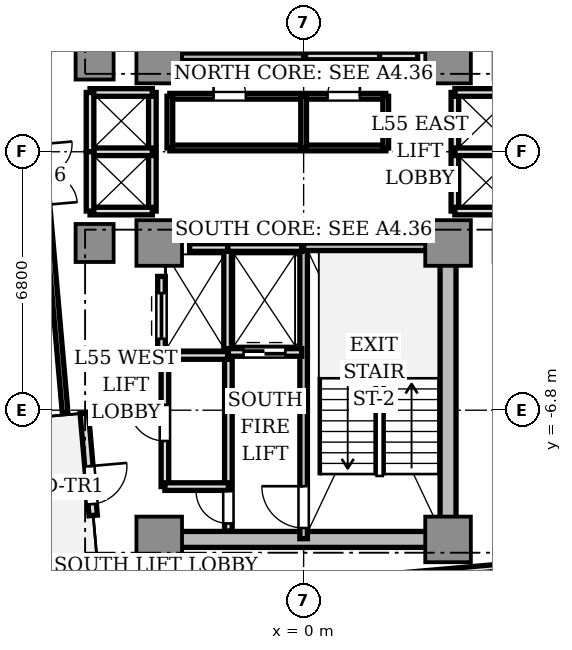
"""IFC4 building model, lengths in metres.
Left out: names, types, materials, properties, quantities, classifications, styles, units other than length and angle.
Written with IfcOpenShell. Run it as: python <this file> out.ifc"""

import sys

from ifc_helpers import new_model, si_unit, direction, frame, frame_2d, origin, origin_2d, place, context, subcontext, project, spatial, rectangle, extrude, source, transform, mapped, element, fill, save


model = new_model("IFC4")
c1 = context("Model", 3, precision=1e-05, world=origin(), true_north=direction((0.0, 1.0)))
c2 = subcontext(c1, "Body", "Model", "MODEL_VIEW")
j1 = project(units=[si_unit("LENGTHUNIT", "METRE"), si_unit("PLANEANGLEUNIT", "RADIAN")], contexts=[c1])
p1 = place(None, origin())
s1 = spatial("IfcSite", under=j1, at=p1, CompositionType="ELEMENT")
p2 = place(p1, origin())
s2 = spatial("IfcBuilding", under=s1, at=p2, CompositionType="ELEMENT")
p3 = place(p2, frame((0.0, 0.0, 198.65)))
s3 = spatial("IfcBuildingStorey", under=s2, at=p3, CompositionType="ELEMENT", Elevation=198.65)
p4 = place(p3, frame((-3.55, -10.2, 0.0), z_axis=(0.0, 0.0, 1.0), x_axis=(1.0, 0.0, 0.0)))
e1 = element("IfcWall", 1, at=p4, inside=s3, PredefinedType="SHEAR", context=c2, shape_type="SweptSolid", body=[
    extrude(rectangle(XDim=7.1, YDim=0.42, at=frame_2d((3.55, 0.0))), origin(), (0.0, 0.0, 1.0), 3.03),
])
p5 = place(p3, frame((3.8, -9.75, 0.0), z_axis=(0.0, 0.0, 1.0), x_axis=(0.0, 1.0, 0.0)))
e2 = element("IfcWall", 2, at=p5, inside=s3, PredefinedType="SHEAR", context=c2, shape_type="SweptSolid", body=[
    extrude(rectangle(XDim=6.9, YDim=0.42, at=frame_2d((3.45, 0.0))), origin(), (0.0, 0.0, 1.0), 3.03),
])
m1 = source(origin(), c2, "Body", "SweptSolid", [
    extrude(rectangle(XDim=1.2, YDim=1.2, at=origin_2d()), origin(), (0.0, 0.0, 1.0), 3.03),
])
for number, where, z_axis, x_axis in (
    (3, (-3.8, 2.4, 0.0), (0.0, 0.0, 1.0), (1.0, 0.0, 0.0)),
    (4, (3.8, 2.4, 0.0), (0.0, 0.0, 1.0), (1.0, 0.0, 0.0)),
    (5, (-3.8, -2.4, 0.0), (0.0, 0.0, 1.0), (1.0, 0.0, 0.0)),
    (6, (3.8, -2.4, 0.0), (0.0, 0.0, 1.0), (1.0, 0.0, 0.0)),
    (7, (-3.8, -10.2, 0.0), (0.0, 0.0, 1.0), (1.0, 0.0, 0.0)),
    (8, (3.8, -10.2, 0.0), (0.0, 0.0, 1.0), (1.0, 0.0, 0.0)),
):
    element("IfcColumn", number, at=place(p3, frame(where, z_axis=z_axis, x_axis=x_axis)), inside=s3, PredefinedType="COLUMN", context=c2, shape_type="MappedRepresentation", body=[
        mapped(m1, transform((0.0, 0.0, 0.0), scale=1.0)),
    ])
m2 = source(origin(), c2, "Body", "SweptSolid", [
    extrude(rectangle(XDim=1.0, YDim=1.0, at=origin_2d()), origin(), (0.0, 0.0, 1.0), 3.03),
])
for number, where, z_axis, x_axis in (
    (9, (-5.5, 2.4, 0.0), (0.0, 0.0, 1.0), (1.0, 0.0, 0.0)),
    (10, (-5.5, -2.4, 0.0), (0.0, 0.0, 1.0), (1.0, 0.0, 0.0)),
):
    element("IfcColumn", number, at=place(p3, frame(where, z_axis=z_axis, x_axis=x_axis)), inside=s3, PredefinedType="COLUMN", context=c2, shape_type="MappedRepresentation", body=[
        mapped(m2, transform((0.0, 0.0, 0.0), scale=1.0)),
    ])
p6 = place(p3, frame((-5.772, -6.879, 0.0), z_axis=(0.0, 0.0, 1.0), x_axis=(0.087168071984, -0.996193619346, 0.0)))
e11 = element("IfcWall", 11, at=p6, inside=s3, PredefinedType="STANDARD", context=c2, shape_type="SweptSolid", body=[
    extrude(rectangle(XDim=2.7, YDim=0.22, at=frame_2d((1.35, 0.0))), origin(), (0.0, 0.0, 1.0), 3.03),
])
p7 = place(p6, frame((1.4, 0.0, 0.0)))
e12 = element("IfcOpeningElement", 12, at=p7, cuts=e11, PredefinedType="OPENING", context=c2, shape_type="SweptSolid", body=[
    extrude(rectangle(XDim=1.0, YDim=2.2, at=frame_2d((0.5, 1.1))), frame((0.0, 0.12, 0.0), z_axis=(0.0, -1.0, 0.0), x_axis=(1.0, 0.0, 0.0)), (0.0, 0.0, 1.0), 0.24),
])
p8 = place(p3, frame((0.0, 2.5, 0.0), z_axis=(0.0, 0.0, 1.0), x_axis=(0.0, 1.0, 0.0)))
e13 = element("IfcWall", 13, at=p8, inside=s3, PredefinedType="SOLIDWALL", context=c2, shape_type="SweptSolid", body=[
    extrude(rectangle(XDim=7.68, YDim=0.2, at=frame_2d((3.84, 0.0))), origin(), (0.0, 0.0, 1.0), 3.03),
])
p9 = place(p8, frame((6.36, 0.0, 0.0)))
e14 = element("IfcOpeningElement", 14, at=p9, cuts=e13, PredefinedType="OPENING", context=c2, shape_type="SweptSolid", body=[
    extrude(rectangle(XDim=1.1, YDim=2.15, at=frame_2d((0.55, 1.075))), frame((0.0, 0.11, 0.0), z_axis=(0.0, -1.0, 0.0), x_axis=(1.0, 0.0, 0.0)), (0.0, 0.0, 1.0), 0.22),
])
p10 = place(p3, frame((-3.72, 2.5, 0.0), z_axis=(0.0, 0.0, 1.0), x_axis=(1.0, 0.0, 0.0)))
e15 = element("IfcWall", 15, at=p10, inside=s3, PredefinedType="SOLIDWALL", context=c2, shape_type="SweptSolid", body=[
    extrude(rectangle(XDim=3.72, YDim=0.2, at=frame_2d((1.86, 0.0))), origin(), (0.0, 0.0, 1.0), 3.03),
])
p11 = place(p3, frame((0.0, -10.18, 0.0), z_axis=(0.0, 0.0, 1.0), x_axis=(0.0, 1.0, 0.0)))
e16 = element("IfcWall", 16, at=p11, inside=s3, PredefinedType="SOLIDWALL", context=c2, shape_type="SweptSolid", body=[
    extrude(rectangle(XDim=7.68, YDim=0.2, at=frame_2d((3.84, 0.0))), origin(), (0.0, 0.0, 1.0), 3.03),
])
p12 = place(p11, frame((0.28, 0.0, 0.0)))
e17 = element("IfcOpeningElement", 17, at=p12, cuts=e16, PredefinedType="OPENING", context=c2, shape_type="SweptSolid", body=[
    extrude(rectangle(XDim=1.1, YDim=2.15, at=frame_2d((0.55, 1.075))), frame((0.0, 0.11, 0.0), z_axis=(0.0, -1.0, 0.0), x_axis=(1.0, 0.0, 0.0)), (0.0, 0.0, 1.0), 0.22),
])
p13 = place(p3, frame((0.0, -2.5, 0.0), z_axis=(0.0, 0.0, 1.0), x_axis=(1.0, 0.0, 0.0)))
e18 = element("IfcWall", 18, at=p13, inside=s3, PredefinedType="SOLIDWALL", context=c2, shape_type="SweptSolid", body=[
    extrude(rectangle(XDim=3.72, YDim=0.2, at=frame_2d((1.86, 0.0))), origin(), (0.0, 0.0, 1.0), 3.03),
])
p14 = place(p3, frame((-1.98, -9.98, 0.0), z_axis=(0.0, 0.0, 1.0), x_axis=(0.0, 1.0, 0.0)))
e19 = element("IfcWall", 19, at=p14, inside=s3, PredefinedType="SOLIDWALL", context=c2, shape_type="SweptSolid", body=[
    extrude(rectangle(XDim=4.66, YDim=0.2, at=frame_2d((2.33, 0.0))), origin(), (0.0, 0.0, 1.0), 2.58),
])
p15 = place(p14, frame((0.2, 0.0, 0.0)))
e20 = element("IfcOpeningElement", 20, at=p15, cuts=e19, PredefinedType="OPENING", context=c2, shape_type="SweptSolid", body=[
    extrude(rectangle(XDim=0.85, YDim=2.1, at=frame_2d((0.425, 1.05))), frame((0.0, 0.11, 0.0), z_axis=(0.0, -1.0, 0.0), x_axis=(1.0, 0.0, 0.0)), (0.0, 0.0, 1.0), 0.22),
])
p16 = place(p3, frame((2.0, 2.5, 0.0), z_axis=(0.0, 0.0, 1.0), x_axis=(0.0, 1.0, 0.0)))
e21 = element("IfcWall", 21, at=p16, inside=s3, PredefinedType="SOLIDWALL", context=c2, shape_type="SweptSolid", body=[
    extrude(rectangle(XDim=2.78, YDim=0.2, at=frame_2d((1.39, 0.0))), origin(), (0.0, 0.0, 1.0), 2.58),
])
p17 = place(p3, frame((0.05, 2.52, 0.0), z_axis=(0.0, 0.0, 1.0), x_axis=(1.0, 0.0, 0.0)))
e22 = element("IfcWall", 22, at=p17, inside=s3, PredefinedType="SOLIDWALL", context=c2, shape_type="SweptSolid", body=[
    extrude(rectangle(XDim=1.95, YDim=0.2, at=frame_2d((0.975, 0.0))), origin(), (0.0, 0.0, 1.0), 2.58),
])
p18 = place(p3, frame((-2.0, -5.28, 0.0), z_axis=(0.0, 0.0, 1.0), x_axis=(0.0, 1.0, 0.0)))
e23 = element("IfcWall", 23, at=p18, inside=s3, PredefinedType="SOLIDWALL", context=c2, shape_type="SweptSolid", body=[
    extrude(rectangle(XDim=2.78, YDim=0.2, at=frame_2d((1.39, 0.0))), origin(), (0.0, 0.0, 1.0), 2.58),
])
p19 = place(p3, frame((-2.0, -2.52, 0.0), z_axis=(0.0, 0.0, 1.0), x_axis=(1.0, 0.0, 0.0)))
e24 = element("IfcWall", 24, at=p19, inside=s3, PredefinedType="SOLIDWALL", context=c2, shape_type="SweptSolid", body=[
    extrude(rectangle(XDim=1.95, YDim=0.2, at=frame_2d((0.975, 0.0))), origin(), (0.0, 0.0, 1.0), 2.58),
])
p20 = place(p3, frame((-1.98, -5.28, 0.0), z_axis=(0.0, 0.0, 1.0), x_axis=(1.0, 0.0, 0.0)))
e25 = element("IfcWall", 25, at=p20, inside=s3, PredefinedType="SOLIDWALL", context=c2, shape_type="SweptSolid", body=[
    extrude(rectangle(XDim=1.93, YDim=0.2, at=frame_2d((0.965, 0.0))), origin(), (0.0, 0.0, 1.0), 2.58),
])
p21 = place(p20, frame((0.4, 0.0, 0.0)))
e26 = element("IfcOpeningElement", 26, at=p21, cuts=e25, PredefinedType="OPENING", context=c2, shape_type="SweptSolid", body=[
    extrude(rectangle(XDim=1.1, YDim=2.2, at=frame_2d((0.55, 1.1))), frame((0.0, 0.11, 0.0), z_axis=(0.0, -1.0, 0.0), x_axis=(1.0, 0.0, 0.0)), (0.0, 0.0, 1.0), 0.22),
])
for number, where, z_axis, x_axis in (
    (27, (2.0, 2.52, 0.0), (0.0, 0.0, 1.0), (1.0, 0.0, 0.0)),
    (28, (-3.0, -2.52, 0.0), (0.0, 0.0, 1.0), (1.0, 0.0, 0.0)),
):
    element("IfcWall", number, at=place(p3, frame(where, z_axis=z_axis, x_axis=x_axis)), inside=s3, PredefinedType="SOLIDWALL", context=c2, shape_type="SweptSolid", body=[
        extrude(rectangle(XDim=1.0, YDim=0.2, at=frame_2d((0.5, 0.0))), origin(), (0.0, 0.0, 1.0), 2.58),
    ])
p22 = place(p3, frame((-3.74, -5.36, 0.0), z_axis=(0.0, 0.0, 1.0), x_axis=(1.0, 0.0, 0.0)))
e29 = element("IfcWall", 29, at=p22, inside=s3, PredefinedType="SOLIDWALL", context=c2, shape_type="SweptSolid", body=[
    extrude(rectangle(XDim=1.74, YDim=0.2, at=frame_2d((0.87, 0.0))), origin(), (0.0, 0.0, 1.0), 2.58),
])
p23 = place(p3, frame((-3.74, -5.36, 0.0), z_axis=(0.0, 0.0, 1.0), x_axis=(0.0, 1.0, 0.0)))
e30 = element("IfcWall", 30, at=p23, inside=s3, PredefinedType="SOLIDWALL", context=c2, shape_type="SweptSolid", body=[
    extrude(rectangle(XDim=2.08, YDim=0.2, at=frame_2d((1.04, 0.0))), origin(), (0.0, 0.0, 1.0), 2.58),
])
p24 = place(p23, frame((0.44, 0.0, 0.0)))
e31 = element("IfcOpeningElement", 31, at=p24, cuts=e30, PredefinedType="OPENING", context=c2, shape_type="SweptSolid", body=[
    extrude(rectangle(XDim=1.2, YDim=2.2, at=frame_2d((0.6, 1.1))), frame((0.0, 0.11, 0.0), z_axis=(0.0, -1.0, 0.0), x_axis=(1.0, 0.0, 0.0)), (0.0, 0.0, 1.0), 0.22),
])
p25 = place(p3, frame((3.98, -1.56, 0.0), z_axis=(0.0, 0.0, 1.0), x_axis=(0.0, 1.0, 0.0)))
e32 = element("IfcWall", 32, at=p25, inside=s3, PredefinedType="SOLIDWALL", context=c2, shape_type="SweptSolid", body=[
    extrude(rectangle(XDim=3.12, YDim=0.2, at=frame_2d((1.56, 0.0))), origin(), (0.0, 0.0, 1.0), 2.2),
])
for number, where, z_axis, x_axis in (
    (33, (3.98, 1.56, 0.0), (0.0, 0.0, 1.0), (1.0, 0.0, 0.0)),
    (34, (3.98, -1.56, 0.0), (0.0, 0.0, 1.0), (1.0, 0.0, 0.0)),
    (35, (3.98, 0.0, 0.0), (0.0, 0.0, 1.0), (1.0, 0.0, 0.0)),
):
    element("IfcWall", number, at=place(p3, frame(where, z_axis=z_axis, x_axis=x_axis)), inside=s3, PredefinedType="SOLIDWALL", context=c2, shape_type="SweptSolid", body=[
        extrude(rectangle(XDim=1.64, YDim=0.2, at=frame_2d((0.82, 0.0))), origin(), (0.0, 0.0, 1.0), 2.58),
    ])
p26 = place(p3, frame((-3.98, -1.56, 0.0), z_axis=(0.0, 0.0, 1.0), x_axis=(0.0, 1.0, 0.0)))
e36 = element("IfcWall", 36, at=p26, inside=s3, PredefinedType="SOLIDWALL", context=c2, shape_type="SweptSolid", body=[
    extrude(rectangle(XDim=3.12, YDim=0.2, at=frame_2d((1.56, 0.0))), origin(), (0.0, 0.0, 1.0), 2.2),
])
for number, where, z_axis, x_axis in (
    (37, (-5.62, 1.56, 0.0), (0.0, 0.0, 1.0), (1.0, 0.0, 0.0)),
    (38, (-5.62, -1.56, 0.0), (0.0, 0.0, 1.0), (1.0, 0.0, 0.0)),
    (39, (-5.62, 0.0, 0.0), (0.0, 0.0, 1.0), (1.0, 0.0, 0.0)),
):
    element("IfcWall", number, at=place(p3, frame(where, z_axis=z_axis, x_axis=x_axis)), inside=s3, PredefinedType="SOLIDWALL", context=c2, shape_type="SweptSolid", body=[
        extrude(rectangle(XDim=1.64, YDim=0.2, at=frame_2d((0.82, 0.0))), origin(), (0.0, 0.0, 1.0), 2.58),
    ])
for number, where, z_axis, x_axis in (
    (40, (-5.62, 0.0, 0.0), (0.0, 0.0, 1.0), (0.0, 1.0, 0.0)),
    (41, (-5.62, -1.56, 0.0), (0.0, 0.0, 1.0), (0.0, 1.0, 0.0)),
):
    element("IfcWall", number, at=place(p3, frame(where, z_axis=z_axis, x_axis=x_axis)), inside=s3, PredefinedType="SOLIDWALL", context=c2, shape_type="SweptSolid", body=[
        extrude(rectangle(XDim=1.56, YDim=0.2, at=frame_2d((0.78, 0.0))), origin(), (0.0, 0.0, 1.0), 2.58),
    ])
p27 = place(p3, frame((-3.65, -8.81, 0.0), z_axis=(0.0, 0.0, 1.0), x_axis=(0.0, 1.0, 0.0)))
e42 = element("IfcWall", 42, at=p27, inside=s3, PredefinedType="SOLIDWALL", context=c2, shape_type="SweptSolid", body=[
    extrude(rectangle(XDim=3.43, YDim=0.2, at=frame_2d((1.715, 0.0))), origin(), (0.0, 0.0, 1.0), 2.58),
])
p28 = place(p27, frame((1.2, 0.0, 0.0)))
e43 = element("IfcOpeningElement", 43, at=p28, cuts=e42, PredefinedType="OPENING", context=c2, shape_type="SweptSolid", body=[
    extrude(rectangle(XDim=0.95, YDim=2.15, at=frame_2d((0.475, 1.075))), frame((0.0, 0.11, 0.0), z_axis=(0.0, -1.0, 0.0), x_axis=(1.0, 0.0, 0.0)), (0.0, 0.0, 1.0), 0.22),
])
p29 = place(p3, frame((-3.65, -8.81, 0.0), z_axis=(0.0, 0.0, 1.0), x_axis=(1.0, 0.0, 0.0)))
e44 = element("IfcWall", 44, at=p29, inside=s3, PredefinedType="SOLIDWALL", context=c2, shape_type="SweptSolid", body=[
    extrude(rectangle(XDim=1.67, YDim=0.2, at=frame_2d((0.835, 0.0))), origin(), (0.0, 0.0, 1.0), 2.58),
])
p30 = place(p3, frame((-3.52, 0.1, 0.0), z_axis=(0.0, 0.0, 1.0), x_axis=(1.0, 0.0, 0.0)))
e45 = element("IfcWall", 45, at=p30, inside=s3, PredefinedType="PARTITIONING", context=c2, shape_type="SweptSolid", body=[
    extrude(rectangle(XDim=5.68, YDim=0.15, at=frame_2d((2.84, 0.0))), origin(), (0.0, 0.0, 1.0), 2.58),
])
p31 = place(p3, frame((-3.52, 1.46, 0.0), z_axis=(0.0, 0.0, 1.0), x_axis=(1.0, 0.0, 0.0)))
e46 = element("IfcWall", 46, at=p31, inside=s3, PredefinedType="PARTITIONING", context=c2, shape_type="SweptSolid", body=[
    extrude(rectangle(XDim=5.68, YDim=0.15, at=frame_2d((2.84, 0.0))), origin(), (0.0, 0.0, 1.0), 2.58),
])
p32 = place(p31, frame((1.15, 0.0, 0.0)))
e47 = element("IfcOpeningElement", 47, at=p32, cuts=e46, PredefinedType="OPENING", context=c2, shape_type="SweptSolid", body=[
    extrude(rectangle(XDim=0.85, YDim=2.1, at=frame_2d((0.425, 1.05))), frame((0.0, 0.085, 0.0), z_axis=(0.0, -1.0, 0.0), x_axis=(1.0, 0.0, 0.0)), (0.0, 0.0, 1.0), 0.17),
])
p33 = place(p31, frame((4.15, 0.0, 0.0)))
e48 = element("IfcOpeningElement", 48, at=p33, cuts=e46, PredefinedType="OPENING", context=c2, shape_type="SweptSolid", body=[
    extrude(rectangle(XDim=0.85, YDim=2.1, at=frame_2d((0.425, 1.05))), frame((0.0, 0.085, 0.0), z_axis=(0.0, -1.0, 0.0), x_axis=(1.0, 0.0, 0.0)), (0.0, 0.0, 1.0), 0.17),
])
p34 = place(p3, frame((-3.52, 0.1, 0.0), z_axis=(0.0, 0.0, 1.0), x_axis=(0.0, 1.0, 0.0)))
e49 = element("IfcWall", 49, at=p34, inside=s3, PredefinedType="PARTITIONING", context=c2, shape_type="SweptSolid", body=[
    extrude(rectangle(XDim=1.36, YDim=0.15, at=frame_2d((0.68, 0.0))), origin(), (0.0, 0.0, 1.0), 2.2),
])
for number, where, z_axis, x_axis in (
    (50, (2.16, 0.1, 0.0), (0.0, 0.0, 1.0), (0.0, 1.0, 0.0)),
    (51, (0.0, 0.1, 0.0), (0.0, 0.0, 1.0), (0.0, 1.0, 0.0)),
):
    element("IfcWall", number, at=place(p3, frame(where, z_axis=z_axis, x_axis=x_axis)), inside=s3, PredefinedType="PARTITIONING", context=c2, shape_type="SweptSolid", body=[
        extrude(rectangle(XDim=1.36, YDim=0.15, at=frame_2d((0.68, 0.0))), origin(), (0.0, 0.0, 1.0), 2.58),
    ])
p35 = place(p3, frame((-7.373, 5.679, 0.0), z_axis=(0.0, 0.0, 1.0), x_axis=(0.087154691724, -0.996194790044, 0.0)))
e52 = element("IfcWall", 52, at=p35, inside=s3, PredefinedType="PARTITIONING", context=c2, shape_type="SweptSolid", body=[
    extrude(rectangle(XDim=12.6, YDim=0.15, at=frame_2d((6.3, 0.0))), origin(), (0.0, 0.0, 1.0), 2.58),
])
p36 = place(p35, frame((5.5, 0.0, 0.0)))
e53 = element("IfcOpeningElement", 53, at=p36, cuts=e52, PredefinedType="OPENING", context=c2, shape_type="SweptSolid", body=[
    extrude(rectangle(XDim=1.6, YDim=2.25, at=frame_2d((0.8, 1.125))), frame((0.0, 0.085, 0.0), z_axis=(0.0, -1.0, 0.0), x_axis=(1.0, 0.0, 0.0)), (0.0, 0.0, 1.0), 0.17),
])
p37 = place(p3, frame((1.936, -11.224, 0.0), z_axis=(0.0, 0.0, 1.0), x_axis=(0.996194212812, 0.087161289348, 0.0)))
e54 = element("IfcWall", 54, at=p37, inside=s3, PredefinedType="PARTITIONING", context=c2, shape_type="SweptSolid", body=[
    extrude(rectangle(XDim=5.35, YDim=0.18, at=frame_2d((2.675, 0.0))), origin(), (0.0, 0.0, 1.0), 2.58),
])
m3 = source(origin(), c2, "Body", "SweptSolid", [
    extrude(rectangle(XDim=1.0, YDim=0.05, at=origin_2d()), origin(), (0.0, 0.0, 1.0), 2.2),
])
p38 = place(p7, frame((0.5, 0.0, 0.0)))
e55 = element("IfcDoor", 55, at=p38, inside=s3, OperationType="SINGLE_SWING_LEFT", PredefinedType="DOOR", context=c2, shape_type="MappedRepresentation", body=[
    mapped(m3, transform((0.0, 0.0, 0.0), scale=1.0)),
])
fill(e12, e55)
m4 = source(origin(), c2, "Body", "SweptSolid", [
    extrude(rectangle(XDim=1.1, YDim=0.05, at=origin_2d()), origin(), (0.0, 0.0, 1.0), 2.15),
])
p39 = place(p12, frame((0.55, 0.0, 0.0)))
e56 = element("IfcDoor", 56, at=p39, inside=s3, OperationType="SINGLE_SWING_RIGHT", PredefinedType="DOOR", context=c2, shape_type="MappedRepresentation", body=[
    mapped(m4, transform((0.0, 0.0, 0.0), scale=1.0)),
])
fill(e17, e56)
m5 = source(origin(), c2, "Body", "SweptSolid", [
    extrude(rectangle(XDim=0.85, YDim=0.05, at=origin_2d()), origin(), (0.0, 0.0, 1.0), 2.1),
])
p40 = place(p15, frame((0.425, 0.0, 0.0)))
e57 = element("IfcDoor", 57, at=p40, inside=s3, OperationType="SINGLE_SWING_RIGHT", PredefinedType="DOOR", context=c2, shape_type="MappedRepresentation", body=[
    mapped(m5, transform((0.0, 0.0, 0.0), scale=1.0)),
])
fill(e20, e57)
m6 = source(origin(), c2, "Body", "SweptSolid", [
    extrude(rectangle(XDim=1.1, YDim=0.05, at=origin_2d()), origin(), (0.0, 0.0, 1.0), 2.2),
])
p41 = place(p21, frame((0.55, 0.0, 0.0)))
e58 = element("IfcDoor", 58, at=p41, inside=s3, OperationType="DOUBLE_DOOR_SLIDING", PredefinedType="DOOR", context=c2, shape_type="MappedRepresentation", body=[
    mapped(m6, transform((0.0, 0.0, 0.0), scale=1.0)),
])
fill(e26, e58)
m7 = source(origin(), c2, "Body", "SweptSolid", [
    extrude(rectangle(XDim=1.2, YDim=0.05, at=origin_2d()), origin(), (0.0, 0.0, 1.0), 2.2),
])
p42 = place(p24, frame((0.6, 0.0, 0.0)))
e59 = element("IfcDoor", 59, at=p42, inside=s3, OperationType="DOUBLE_DOOR_SLIDING", PredefinedType="DOOR", context=c2, shape_type="MappedRepresentation", body=[
    mapped(m7, transform((0.0, 0.0, 0.0), scale=1.0)),
])
fill(e31, e59)
m8 = source(origin(), c2, "Body", "SweptSolid", [
    extrude(rectangle(XDim=0.95, YDim=0.05, at=origin_2d()), origin(), (0.0, 0.0, 1.0), 2.15),
])
p43 = place(p28, frame((0.475, 0.0, 0.0)))
e60 = element("IfcDoor", 60, at=p43, inside=s3, OperationType="SINGLE_SWING_RIGHT", PredefinedType="DOOR", context=c2, shape_type="MappedRepresentation", body=[
    mapped(m8, transform((0.0, 0.0, 0.0), scale=1.0)),
])
fill(e43, e60)
p44 = place(p32, frame((0.425, 0.0, 0.0)))
e61 = element("IfcDoor", 61, at=p44, inside=s3, OperationType="SINGLE_SWING_LEFT", PredefinedType="DOOR", context=c2, shape_type="MappedRepresentation", body=[
    mapped(m5, transform((0.0, 0.0, 0.0), scale=1.0)),
])
fill(e47, e61)
p45 = place(p33, frame((0.425, 0.0, 0.0)))
e62 = element("IfcDoor", 62, at=p45, inside=s3, OperationType="SINGLE_SWING_RIGHT", PredefinedType="DOOR", context=c2, shape_type="MappedRepresentation", body=[
    mapped(m5, transform((0.0, 0.0, 0.0), scale=1.0)),
])
fill(e48, e62)
save(model, sys.argv[1])
